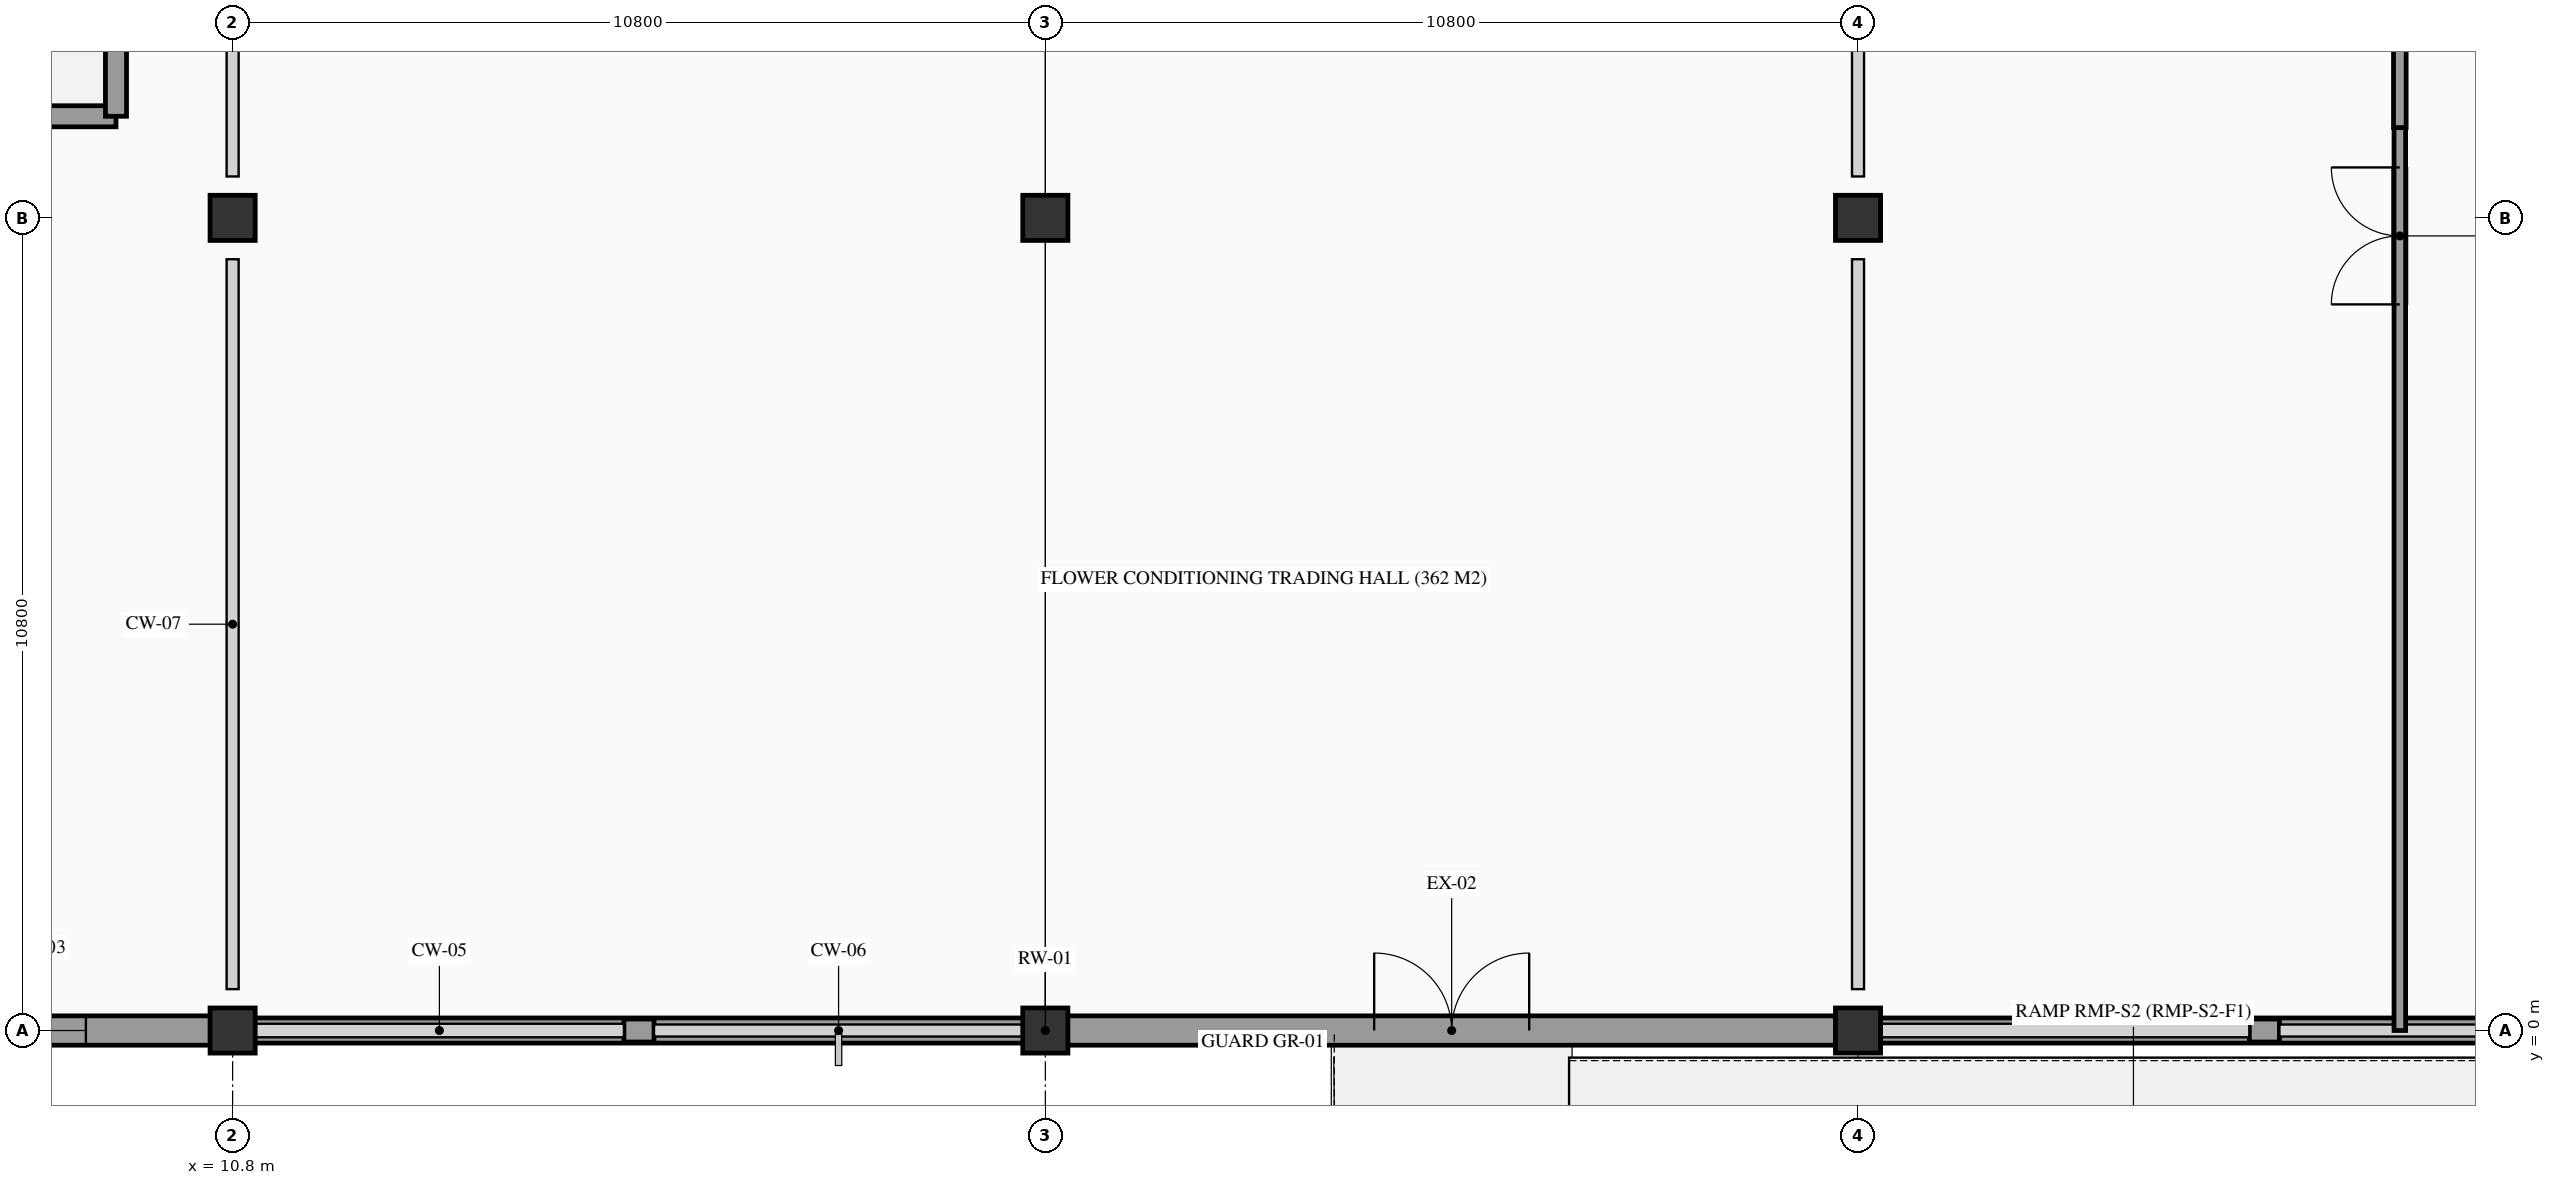
"""IFC4 building model, lengths in metres.
Left out: names, types, materials, properties, quantities, classifications, styles, units other than length and angle.
Written with IfcOpenShell. Run it as: python <this file> out.ifc"""

import sys

from ifc_helpers import new_model, si_unit, direction, frame, frame_2d, origin, origin_2d, place, context, subcontext, project, spatial, rectangle, extrude, element, fill, save


model = new_model("IFC4")
c1 = context("Model", 3, precision=1e-05, world=origin(), true_north=direction((0.0, 1.0)))
c2 = subcontext(c1, "Body", "Model", "MODEL_VIEW")
j1 = project(units=[si_unit("LENGTHUNIT", "METRE"), si_unit("PLANEANGLEUNIT", "RADIAN")], contexts=[c1])
p1 = place(None, origin())
s1 = spatial("IfcSite", under=j1, at=p1, CompositionType="ELEMENT")
p2 = place(p1, origin())
s2 = spatial("IfcBuilding", under=s1, at=p2, CompositionType="ELEMENT")
p3 = place(p2, origin())
s3 = spatial("IfcBuildingStorey", under=s2, at=p3, CompositionType="ELEMENT", Elevation=0.0)
for number, where, z_axis, x_axis in (
    (1, (10.8, 0.0, -1.2), (0.0, 0.0, 1.0), (1.0, 0.0, 0.0)),
    (2, (10.8, 10.8, -1.2), (0.0, 0.0, 1.0), (1.0, 0.0, 0.0)),
    (3, (21.6, 0.0, -1.2), (0.0, 0.0, 1.0), (1.0, 0.0, 0.0)),
    (4, (21.6, 10.8, -1.2), (0.0, 0.0, 1.0), (1.0, 0.0, 0.0)),
    (5, (32.4, 0.0, -1.2), (0.0, 0.0, 1.0), (1.0, 0.0, 0.0)),
    (6, (32.4, 10.8, -1.2), (0.0, 0.0, 1.0), (1.0, 0.0, 0.0)),
):
    element("IfcColumn", number, at=place(p3, frame(where, z_axis=z_axis, x_axis=x_axis)), inside=s3, PredefinedType="COLUMN", context=c2, shape_type="SweptSolid", body=[
        extrude(rectangle(XDim=0.6, YDim=0.6, at=origin_2d()), origin(), (0.0, 0.0, 1.0), 6.6),
    ])
p4 = place(p3, frame((0.45, 0.0, -1.2), z_axis=(0.0, 0.0, 1.0), x_axis=(1.0, 0.0, 0.0)))
e7 = element("IfcWall", 7, at=p4, inside=s3, PredefinedType="USERDEFINED", context=c2, shape_type="SweptSolid", body=[
    extrude(rectangle(XDim=42.3, YDim=0.334, at=frame_2d((21.15, 0.0))), origin(), (0.0, 0.0, 1.0), 0.14),
])
p5 = place(p3, frame((0.295, 0.0, 0.0), z_axis=(0.0, 0.0, 1.0), x_axis=(1.0, 0.0, 0.0)))
e8 = element("IfcWall", 8, at=p5, inside=s3, PredefinedType="STANDARD", context=c2, shape_type="SweptSolid", body=[
    extrude(rectangle(XDim=10.21, YDim=0.39, at=frame_2d((5.105, 0.0))), origin(), (0.0, 0.0, 1.0), 4.198),
])
p6 = place(p5, frame((1.525, 0.0, 0.95)))
e9 = element("IfcOpeningElement", 9, at=p6, cuts=e8, PredefinedType="OPENING", context=c2, shape_type="SweptSolid", body=[
    extrude(rectangle(XDim=1.05, YDim=0.9, at=frame_2d((0.525, 0.45))), frame((0.0, 0.205, 0.0), z_axis=(0.0, -1.0, 0.0), x_axis=(1.0, 0.0, 0.0)), (0.0, 0.0, 1.0), 0.41),
])
p7 = place(p5, frame((4.395, 0.0, 0.95)))
e10 = element("IfcOpeningElement", 10, at=p7, cuts=e8, PredefinedType="OPENING", context=c2, shape_type="SweptSolid", body=[
    extrude(rectangle(XDim=1.17, YDim=0.9, at=frame_2d((0.585, 0.45))), frame((0.0, 0.205, 0.0), z_axis=(0.0, -1.0, 0.0), x_axis=(1.0, 0.0, 0.0)), (0.0, 0.0, 1.0), 0.41),
])
p8 = place(p5, frame((7.265, 0.0, 0.95)))
e11 = element("IfcOpeningElement", 11, at=p8, cuts=e8, PredefinedType="OPENING", context=c2, shape_type="SweptSolid", body=[
    extrude(rectangle(XDim=1.29, YDim=0.9, at=frame_2d((0.645, 0.45))), frame((0.0, 0.205, 0.0), z_axis=(0.0, -1.0, 0.0), x_axis=(1.0, 0.0, 0.0)), (0.0, 0.0, 1.0), 0.41),
])
p9 = place(p3, frame((16.0, 0.0, 0.0), z_axis=(0.0, 0.0, 1.0), x_axis=(1.0, 0.0, 0.0)))
e12 = element("IfcWall", 12, at=p9, inside=s3, PredefinedType="STANDARD", context=c2, shape_type="SweptSolid", body=[
    extrude(rectangle(XDim=0.4, YDim=0.305, at=frame_2d((0.2, 0.0))), origin(), (0.0, 0.0, 1.0), 4.198),
])
p10 = place(p3, frame((21.895, 0.0, 0.0), z_axis=(0.0, 0.0, 1.0), x_axis=(1.0, 0.0, 0.0)))
e13 = element("IfcWall", 13, at=p10, inside=s3, PredefinedType="STANDARD", context=c2, shape_type="SweptSolid", body=[
    extrude(rectangle(XDim=10.21, YDim=0.39, at=frame_2d((5.105, 0.0))), origin(), (0.0, 0.0, 1.0), 4.198),
])
p11 = place(p10, frame((4.075, 0.0, 0.0)))
e14 = element("IfcOpeningElement", 14, at=p11, cuts=e13, PredefinedType="OPENING", context=c2, shape_type="SweptSolid", body=[
    extrude(rectangle(XDim=2.06, YDim=2.4, at=frame_2d((1.03, 1.2))), frame((0.0, 0.205, 0.0), z_axis=(0.0, -1.0, 0.0), x_axis=(1.0, 0.0, 0.0)), (0.0, 0.0, 1.0), 0.41),
])
p12 = place(p3, frame((37.6, 0.0, 0.0), z_axis=(0.0, 0.0, 1.0), x_axis=(1.0, 0.0, 0.0)))
e15 = element("IfcWall", 15, at=p12, inside=s3, PredefinedType="STANDARD", context=c2, shape_type="SweptSolid", body=[
    extrude(rectangle(XDim=0.4, YDim=0.305, at=frame_2d((0.2, 0.0))), origin(), (0.0, 0.0, 1.0), 4.198),
])
p13 = place(p3, frame((1.35, 12.15, 0.0), z_axis=(0.0, 0.0, 1.0), x_axis=(1.0, 0.0, 0.0)))
e16 = element("IfcWall", 16, at=p13, inside=s3, PredefinedType="SHEAR", context=c2, shape_type="SweptSolid", body=[
    extrude(rectangle(XDim=7.9, YDim=0.28, at=frame_2d((3.95, 0.0))), origin(), (0.0, 0.0, 1.0), 5.4),
])
p14 = place(p3, frame((9.25, 12.15, 0.0), z_axis=(0.0, 0.0, 1.0), x_axis=(0.0, 1.0, 0.0)))
e17 = element("IfcWall", 17, at=p14, inside=s3, PredefinedType="SHEAR", context=c2, shape_type="SweptSolid", body=[
    extrude(rectangle(XDim=3.9, YDim=0.28, at=frame_2d((1.95, 0.0))), origin(), (0.0, 0.0, 1.0), 5.4),
])
p15 = place(p3, frame((39.6, 0.0, 0.0), z_axis=(0.0, 0.0, 1.0), x_axis=(0.0, 1.0, 0.0)))
e18 = element("IfcWall", 18, at=p15, inside=s3, PredefinedType="PARTITIONING", context=c2, shape_type="SweptSolid", body=[
    extrude(rectangle(XDim=12.0, YDim=0.154, at=frame_2d((6.0, 0.0))), origin(), (0.0, 0.0, 1.0), 3.95),
])
p16 = place(p15, frame((9.65, 0.0, 0.0)))
e19 = element("IfcOpeningElement", 19, at=p16, cuts=e18, PredefinedType="OPENING", context=c2, shape_type="SweptSolid", body=[
    extrude(rectangle(XDim=1.82, YDim=2.25, at=frame_2d((0.91, 1.125))), frame((0.0, 0.087, 0.0), z_axis=(0.0, -1.0, 0.0), x_axis=(1.0, 0.0, 0.0)), (0.0, 0.0, 1.0), 0.174),
])
p17 = place(p3, frame((39.6, 12.0, 0.0), z_axis=(0.0, 0.0, 1.0), x_axis=(0.0, 1.0, 0.0)))
e20 = element("IfcWall", 20, at=p17, inside=s3, PredefinedType="PARTITIONING", context=c2, shape_type="SweptSolid", body=[
    extrude(rectangle(XDim=4.8, YDim=0.168, at=frame_2d((2.4, 0.0))), origin(), (0.0, 0.0, 1.0), 3.95),
])
p18 = place(p8, frame((1.29, 0.0, 0.0), z_axis=(0.0, 0.0, 1.0), x_axis=(-1.0, 0.0, 0.0)))
e21 = element("IfcWindow", 21, at=p18, inside=s3, PartitioningType="SINGLE_PANEL", PredefinedType="WINDOW", context=c2, shape_type="SweptSolid", body=[
    extrude(rectangle(XDim=1.29, YDim=0.9, at=frame_2d((0.645, 0.45))), frame((0.0, 0.03, 0.0), z_axis=(0.0, -1.0, 0.0), x_axis=(1.0, 0.0, 0.0)), (0.0, 0.0, 1.0), 0.06),
])
fill(e11, e21)
p19 = place(p11, frame((2.06, 0.0, 0.0), z_axis=(0.0, 0.0, 1.0), x_axis=(-1.0, 0.0, 0.0)))
e22 = element("IfcDoor", 22, at=p19, inside=s3, OperationType="DOUBLE_DOOR_SINGLE_SWING", PredefinedType="DOOR", context=c2, shape_type="SweptSolid", body=[
    extrude(rectangle(XDim=2.06, YDim=2.4, at=frame_2d((1.03, 1.2))), frame((0.0, 0.025, 0.0), z_axis=(0.0, -1.0, 0.0), x_axis=(1.0, 0.0, 0.0)), (0.0, 0.0, 1.0), 0.05),
])
fill(e14, e22)
p20 = place(p16, frame((1.82, 0.0, 0.0), z_axis=(0.0, 0.0, 1.0), x_axis=(-1.0, 0.0, 0.0)))
e23 = element("IfcDoor", 23, at=p20, inside=s3, OperationType="DOUBLE_DOOR_SINGLE_SWING", PredefinedType="DOOR", context=c2, shape_type="SweptSolid", body=[
    extrude(rectangle(XDim=1.82, YDim=2.25, at=frame_2d((0.91, 1.125))), frame((0.0, 0.025, 0.0), z_axis=(0.0, -1.0, 0.0), x_axis=(1.0, 0.0, 0.0)), (0.0, 0.0, 1.0), 0.05),
])
fill(e19, e23)
save(model, sys.argv[1])
